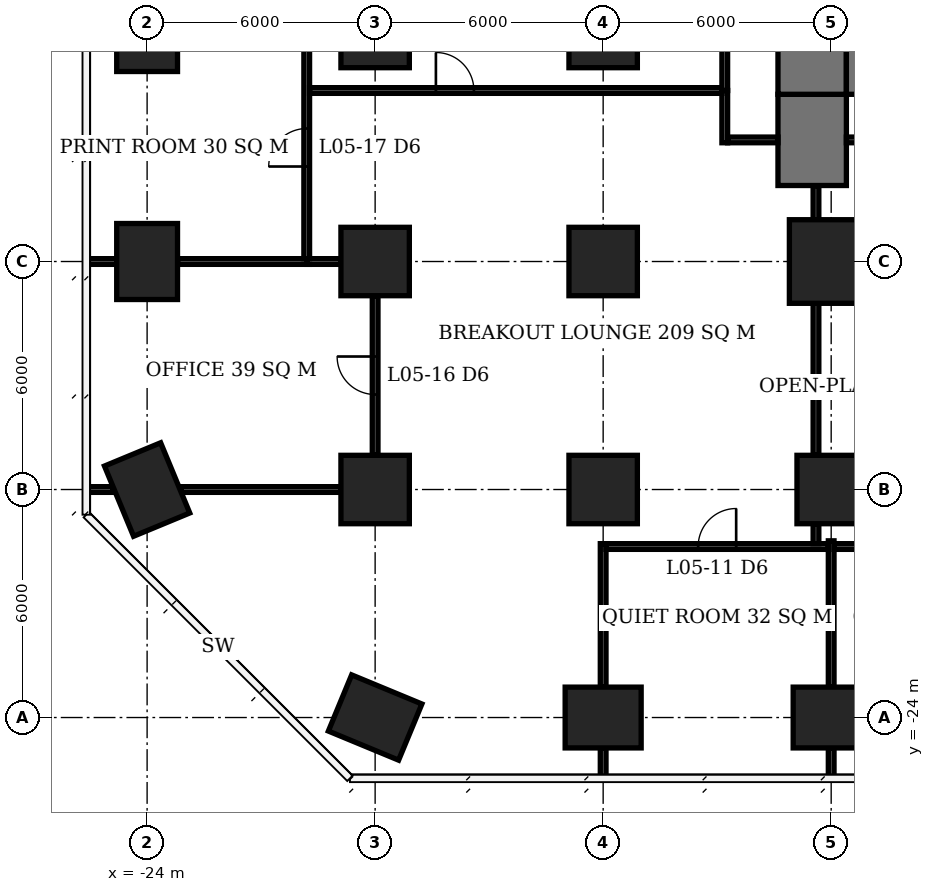
"""IFC4 building model, lengths in metres.
Left out: names, types, materials, properties, quantities, classifications, styles, units other than length and angle.
Written with IfcOpenShell. Run it as: python <this file> out.ifc"""

import sys

from ifc_helpers import new_model, si_unit, direction, frame, frame_2d, origin, origin_2d, place, context, subcontext, project, spatial, rectangle, extrude, element, fill, save


model = new_model("IFC4")
c1 = context("Model", 3, precision=1e-05, world=origin(), true_north=direction((0.0, 1.0)))
c2 = subcontext(c1, "Body", "Model", "MODEL_VIEW")
j1 = project(units=[si_unit("LENGTHUNIT", "METRE"), si_unit("PLANEANGLEUNIT", "RADIAN")], contexts=[c1])
p1 = place(None, origin())
s1 = spatial("IfcSite", under=j1, at=p1, CompositionType="ELEMENT")
p2 = place(p1, origin())
s2 = spatial("IfcBuilding", under=s1, at=p2, CompositionType="ELEMENT")
p3 = place(p2, frame((0.0, 0.0, 26.0)))
s3 = spatial("IfcBuildingStorey", under=s2, at=p3, CompositionType="ELEMENT", Elevation=26.0)
for number, where, z_axis, x_axis in (
    (1, (-24.0, -18.0, 0.0), (0.0, 0.0, 1.0), (-0.383, 0.924, 0.0)),
    (2, (-24.0, -12.0, 0.0), (0.0, 0.0, 1.0), (0.0, 1.0, 0.0)),
    (3, (-24.0, -6.0, 0.0), (0.0, 0.0, 1.0), (0.0, 1.0, 0.0)),
    (4, (-18.0, -24.0, 0.0), (0.0, 0.0, 1.0), (-0.924, 0.383, 0.0)),
):
    element("IfcColumn", number, at=place(p3, frame(where, z_axis=z_axis, x_axis=x_axis)), inside=s3, PredefinedType="COLUMN", context=c2, shape_type="SweptSolid", body=[
        extrude(rectangle(XDim=2.0, YDim=1.6, at=origin_2d()), origin(), (0.0, 0.0, 1.0), 3.9),
    ])
for number, where, z_axis, x_axis in (
    (5, (-18.0, -18.0, 0.0), (0.0, 0.0, 1.0), (1.0, 0.0, 0.0)),
    (6, (-18.0, -12.0, 0.0), (0.0, 0.0, 1.0), (1.0, 0.0, 0.0)),
    (7, (-18.0, -6.0, 0.0), (0.0, 0.0, 1.0), (1.0, 0.0, 0.0)),
):
    element("IfcColumn", number, at=place(p3, frame(where, z_axis=z_axis, x_axis=x_axis)), inside=s3, PredefinedType="COLUMN", context=c2, shape_type="SweptSolid", body=[
        extrude(rectangle(XDim=1.8, YDim=1.8, at=origin_2d()), origin(), (0.0, 0.0, 1.0), 3.9),
    ])
p4 = place(p3, frame((-12.0, -24.0, 0.0), z_axis=(0.0, 0.0, 1.0), x_axis=(1.0, 0.0, 0.0)))
e8 = element("IfcColumn", 8, at=p4, inside=s3, PredefinedType="COLUMN", context=c2, shape_type="SweptSolid", body=[
    extrude(rectangle(XDim=2.0, YDim=1.6, at=origin_2d()), origin(), (0.0, 0.0, 1.0), 3.9),
])
for number, where, z_axis, x_axis in (
    (9, (-12.0, -18.0, 0.0), (0.0, 0.0, 1.0), (1.0, 0.0, 0.0)),
    (10, (-12.0, -12.0, 0.0), (0.0, 0.0, 1.0), (1.0, 0.0, 0.0)),
    (11, (-12.0, -6.0, 0.0), (0.0, 0.0, 1.0), (1.0, 0.0, 0.0)),
):
    element("IfcColumn", number, at=place(p3, frame(where, z_axis=z_axis, x_axis=x_axis)), inside=s3, PredefinedType="COLUMN", context=c2, shape_type="SweptSolid", body=[
        extrude(rectangle(XDim=1.8, YDim=1.8, at=origin_2d()), origin(), (0.0, 0.0, 1.0), 3.9),
    ])
p5 = place(p3, frame((-6.0, -24.0, 0.0), z_axis=(0.0, 0.0, 1.0), x_axis=(1.0, 0.0, 0.0)))
e12 = element("IfcColumn", 12, at=p5, inside=s3, PredefinedType="COLUMN", context=c2, shape_type="SweptSolid", body=[
    extrude(rectangle(XDim=2.0, YDim=1.6, at=origin_2d()), origin(), (0.0, 0.0, 1.0), 3.9),
])
p6 = place(p3, frame((-6.0, -18.0, 0.0), z_axis=(0.0, 0.0, 1.0), x_axis=(1.0, 0.0, 0.0)))
e13 = element("IfcColumn", 13, at=p6, inside=s3, PredefinedType="COLUMN", context=c2, shape_type="SweptSolid", body=[
    extrude(rectangle(XDim=1.8, YDim=1.8, at=origin_2d()), origin(), (0.0, 0.0, 1.0), 3.9),
])
p7 = place(p3, frame((-6.0, -12.0, 0.0), z_axis=(0.0, 0.0, 1.0), x_axis=(1.0, 0.0, 0.0)))
e14 = element("IfcColumn", 14, at=p7, inside=s3, PredefinedType="COLUMN", context=c2, shape_type="SweptSolid", body=[
    extrude(rectangle(XDim=2.2, YDim=2.2, at=origin_2d()), origin(), (0.0, 0.0, 1.0), 3.9),
])
p8 = place(p3, frame((-5.6, -6.6, 0.0), z_axis=(0.0, 0.0, 1.0), x_axis=(1.0, 0.0, 0.0)))
e15 = element("IfcWall", 15, at=p8, inside=s3, PredefinedType="SHEAR", context=c2, shape_type="SweptSolid", body=[
    extrude(rectangle(XDim=23.2, YDim=2.0, at=frame_2d((11.6, 0.0))), origin(), (0.0, 0.0, 1.0), 3.9),
])
p9 = place(p3, frame((-6.5, -7.6, 0.0), z_axis=(0.0, 0.0, 1.0), x_axis=(0.0, 1.0, 0.0)))
e16 = element("IfcWall", 16, at=p9, inside=s3, PredefinedType="SHEAR", context=c2, shape_type="SweptSolid", body=[
    extrude(rectangle(XDim=21.2, YDim=1.8, at=frame_2d((10.6, 0.0))), origin(), (0.0, 0.0, 1.0), 3.9),
])
p10 = place(p9, frame((7.8, 0.0, 0.0)))
e17 = element("IfcOpeningElement", 17, at=p10, cuts=e16, PredefinedType="OPENING", context=c2, shape_type="SweptSolid", body=[
    extrude(rectangle(XDim=1.8, YDim=2.4, at=frame_2d((0.9, 1.2))), frame((0.0, 0.91, 0.0), z_axis=(0.0, -1.0, 0.0), x_axis=(1.0, 0.0, 0.0)), (0.0, 0.0, 1.0), 1.82),
])
p11 = place(p3, frame((-6.5, -10.0, 0.0), z_axis=(0.0, 0.0, 1.0), x_axis=(0.0, 1.0, 0.0)))
e18 = element("IfcWall", 18, at=p11, inside=s3, PredefinedType="SHEAR", context=c2, shape_type="SweptSolid", body=[
    extrude(rectangle(XDim=2.4, YDim=1.8, at=frame_2d((1.2, 0.0))), origin(), (0.0, 0.0, 1.0), 3.9),
])
p12 = place(p3, frame((-11.925, -19.5, 0.0), z_axis=(0.0, 0.0, 1.0), x_axis=(1.0, 0.0, 0.0)))
e19 = element("IfcWall", 19, at=p12, inside=s3, PredefinedType="PARTITIONING", context=c2, shape_type="SweptSolid", body=[
    extrude(rectangle(XDim=5.85, YDim=0.15, at=frame_2d((2.925, 0.0))), origin(), (0.0, 0.0, 1.0), 3.65),
])
p13 = place(p12, frame((2.425, 0.0, 0.0)))
e20 = element("IfcOpeningElement", 20, at=p13, cuts=e19, PredefinedType="OPENING", context=c2, shape_type="SweptSolid", body=[
    extrude(rectangle(XDim=1.0, YDim=2.1, at=frame_2d((0.5, 1.05))), frame((0.0, 0.085, 0.0), z_axis=(0.0, -1.0, 0.0), x_axis=(1.0, 0.0, 0.0)), (0.0, 0.0, 1.0), 0.17),
])
p14 = place(p3, frame((-5.925, -19.5, 0.0), z_axis=(0.0, 0.0, 1.0), x_axis=(1.0, 0.0, 0.0)))
e21 = element("IfcWall", 21, at=p14, inside=s3, PredefinedType="PARTITIONING", context=c2, shape_type="SweptSolid", body=[
    extrude(rectangle(XDim=5.85, YDim=0.15, at=frame_2d((2.925, 0.0))), origin(), (0.0, 0.0, 1.0), 3.65),
])
p15 = place(p14, frame((2.425, 0.0, 0.0)))
e22 = element("IfcOpeningElement", 22, at=p15, cuts=e21, PredefinedType="OPENING", context=c2, shape_type="SweptSolid", body=[
    extrude(rectangle(XDim=1.0, YDim=2.1, at=frame_2d((0.5, 1.05))), frame((0.0, 0.085, 0.0), z_axis=(0.0, -1.0, 0.0), x_axis=(1.0, 0.0, 0.0)), (0.0, 0.0, 1.0), 0.17),
])
p16 = place(p3, frame((-25.6, -18.0, 0.0), z_axis=(0.0, 0.0, 1.0), x_axis=(1.0, 0.0, 0.0)))
e23 = element("IfcWall", 23, at=p16, inside=s3, PredefinedType="PARTITIONING", context=c2, shape_type="SweptSolid", body=[
    extrude(rectangle(XDim=0.703, YDim=0.15, at=frame_2d((0.352, 0.0))), origin(), (0.0, 0.0, 1.0), 3.65),
])
p17 = place(p3, frame((-23.103, -18.0, 0.0), z_axis=(0.0, 0.0, 1.0), x_axis=(1.0, 0.0, 0.0)))
e24 = element("IfcWall", 24, at=p17, inside=s3, PredefinedType="PARTITIONING", context=c2, shape_type="SweptSolid", body=[
    extrude(rectangle(XDim=4.203, YDim=0.15, at=frame_2d((2.102, 0.0))), origin(), (0.0, 0.0, 1.0), 3.65),
])
p18 = place(p3, frame((-25.6, -12.0, 0.0), z_axis=(0.0, 0.0, 1.0), x_axis=(1.0, 0.0, 0.0)))
e25 = element("IfcWall", 25, at=p18, inside=s3, PredefinedType="PARTITIONING", context=c2, shape_type="SweptSolid", body=[
    extrude(rectangle(XDim=0.8, YDim=0.15, at=frame_2d((0.4, 0.0))), origin(), (0.0, 0.0, 1.0), 3.65),
])
p19 = place(p3, frame((-23.2, -12.0, 0.0), z_axis=(0.0, 0.0, 1.0), x_axis=(1.0, 0.0, 0.0)))
e26 = element("IfcWall", 26, at=p19, inside=s3, PredefinedType="PARTITIONING", context=c2, shape_type="SweptSolid", body=[
    extrude(rectangle(XDim=3.475, YDim=0.15, at=frame_2d((1.737, 0.0))), origin(), (0.0, 0.0, 1.0), 3.65),
])
p20 = place(p3, frame((-19.8, -12.0, 0.0), z_axis=(0.0, 0.0, 1.0), x_axis=(1.0, 0.0, 0.0)))
e27 = element("IfcWall", 27, at=p20, inside=s3, PredefinedType="PARTITIONING", context=c2, shape_type="SweptSolid", body=[
    extrude(rectangle(XDim=0.9, YDim=0.15, at=frame_2d((0.45, 0.0))), origin(), (0.0, 0.0, 1.0), 3.65),
])
p21 = place(p3, frame((-19.8, -11.925, 0.0), z_axis=(0.0, 0.0, 1.0), x_axis=(0.0, 1.0, 0.0)))
e28 = element("IfcWall", 28, at=p21, inside=s3, PredefinedType="PARTITIONING", context=c2, shape_type="SweptSolid", body=[
    extrude(rectangle(XDim=5.85, YDim=0.15, at=frame_2d((2.925, 0.0))), origin(), (0.0, 0.0, 1.0), 3.65),
])
p22 = place(p21, frame((2.425, 0.0, 0.0)))
e29 = element("IfcOpeningElement", 29, at=p22, cuts=e28, PredefinedType="OPENING", context=c2, shape_type="SweptSolid", body=[
    extrude(rectangle(XDim=1.0, YDim=2.1, at=frame_2d((0.5, 1.05))), frame((0.0, 0.085, 0.0), z_axis=(0.0, -1.0, 0.0), x_axis=(1.0, 0.0, 0.0)), (0.0, 0.0, 1.0), 0.17),
])
p23 = place(p3, frame((-18.0, -17.1, 0.0), z_axis=(0.0, 0.0, 1.0), x_axis=(0.0, 1.0, 0.0)))
e30 = element("IfcWall", 30, at=p23, inside=s3, PredefinedType="PARTITIONING", context=c2, shape_type="SweptSolid", body=[
    extrude(rectangle(XDim=4.2, YDim=0.15, at=frame_2d((2.1, 0.0))), origin(), (0.0, 0.0, 1.0), 3.65),
])
p24 = place(p23, frame((1.6, 0.0, 0.0)))
e31 = element("IfcOpeningElement", 31, at=p24, cuts=e30, PredefinedType="OPENING", context=c2, shape_type="SweptSolid", body=[
    extrude(rectangle(XDim=1.0, YDim=2.1, at=frame_2d((0.5, 1.05))), frame((0.0, 0.085, 0.0), z_axis=(0.0, -1.0, 0.0), x_axis=(1.0, 0.0, 0.0)), (0.0, 0.0, 1.0), 0.17),
])
p25 = place(p3, frame((-12.0, -25.6, 0.0), z_axis=(0.0, 0.0, 1.0), x_axis=(0.0, 1.0, 0.0)))
e32 = element("IfcWall", 32, at=p25, inside=s3, PredefinedType="PARTITIONING", context=c2, shape_type="SweptSolid", body=[
    extrude(rectangle(XDim=0.8, YDim=0.15, at=frame_2d((0.4, 0.0))), origin(), (0.0, 0.0, 1.0), 3.65),
])
p26 = place(p3, frame((-12.0, -23.2, 0.0), z_axis=(0.0, 0.0, 1.0), x_axis=(0.0, 1.0, 0.0)))
e33 = element("IfcWall", 33, at=p26, inside=s3, PredefinedType="PARTITIONING", context=c2, shape_type="SweptSolid", body=[
    extrude(rectangle(XDim=3.775, YDim=0.15, at=frame_2d((1.887, 0.0))), origin(), (0.0, 0.0, 1.0), 3.65),
])
p27 = place(p3, frame((-6.0, -25.6, 0.0), z_axis=(0.0, 0.0, 1.0), x_axis=(0.0, 1.0, 0.0)))
e34 = element("IfcWall", 34, at=p27, inside=s3, PredefinedType="PARTITIONING", context=c2, shape_type="SweptSolid", body=[
    extrude(rectangle(XDim=0.8, YDim=0.15, at=frame_2d((0.4, 0.0))), origin(), (0.0, 0.0, 1.0), 3.65),
])
p28 = place(p3, frame((-6.0, -23.2, 0.0), z_axis=(0.0, 0.0, 1.0), x_axis=(0.0, 1.0, 0.0)))
e35 = element("IfcWall", 35, at=p28, inside=s3, PredefinedType="PARTITIONING", context=c2, shape_type="SweptSolid", body=[
    extrude(rectangle(XDim=3.85, YDim=0.15, at=frame_2d((1.925, 0.0))), origin(), (0.0, 0.0, 1.0), 3.65),
])
p29 = place(p3, frame((-19.725, -7.5, 0.0), z_axis=(0.0, 0.0, 1.0), x_axis=(1.0, 0.0, 0.0)))
e36 = element("IfcWall", 36, at=p29, inside=s3, PredefinedType="PARTITIONING", context=c2, shape_type="SweptSolid", body=[
    extrude(rectangle(XDim=10.85, YDim=0.15, at=frame_2d((5.425, 0.0))), origin(), (0.0, 0.0, 1.0), 3.65),
])
p30 = place(p29, frame((3.324, 0.0, 0.0)))
e37 = element("IfcOpeningElement", 37, at=p30, cuts=e36, PredefinedType="OPENING", context=c2, shape_type="SweptSolid", body=[
    extrude(rectangle(XDim=1.0, YDim=2.1, at=frame_2d((0.5, 1.05))), frame((0.0, 0.085, 0.0), z_axis=(0.0, -1.0, 0.0), x_axis=(1.0, 0.0, 0.0)), (0.0, 0.0, 1.0), 0.17),
])
p31 = place(p3, frame((-8.8, -8.875, 0.0), z_axis=(0.0, 0.0, 1.0), x_axis=(0.0, 1.0, 0.0)))
e38 = element("IfcWall", 38, at=p31, inside=s3, PredefinedType="PARTITIONING", context=c2, shape_type="SweptSolid", body=[
    extrude(rectangle(XDim=1.375, YDim=0.15, at=frame_2d((0.688, 0.0))), origin(), (0.0, 0.0, 1.0), 3.65),
])
p32 = place(p3, frame((-8.725, -8.8, 0.0), z_axis=(0.0, 0.0, 1.0), x_axis=(1.0, 0.0, 0.0)))
e39 = element("IfcWall", 39, at=p32, inside=s3, PredefinedType="PARTITIONING", context=c2, shape_type="SweptSolid", body=[
    extrude(rectangle(XDim=1.325, YDim=0.15, at=frame_2d((0.663, 0.0))), origin(), (0.0, 0.0, 1.0), 3.65),
])
p33 = place(p3, frame((-8.8, -7.5, 0.0), z_axis=(0.0, 0.0, 1.0), x_axis=(0.0, 1.0, 0.0)))
e40 = element("IfcWall", 40, at=p33, inside=s3, PredefinedType="PARTITIONING", context=c2, shape_type="SweptSolid", body=[
    extrude(rectangle(XDim=8.925, YDim=0.15, at=frame_2d((4.462, 0.0))), origin(), (0.0, 0.0, 1.0), 3.65),
])
p34 = place(p33, frame((2.65, 0.0, 0.0)))
e41 = element("IfcOpeningElement", 41, at=p34, cuts=e40, PredefinedType="OPENING", context=c2, shape_type="SweptSolid", body=[
    extrude(rectangle(XDim=1.0, YDim=2.1, at=frame_2d((0.5, 1.05))), frame((0.0, 0.085, 0.0), z_axis=(0.0, -1.0, 0.0), x_axis=(1.0, 0.0, 0.0)), (0.0, 0.0, 1.0), 0.17),
])
p35 = place(p3, frame((-6.4, -19.425, 0.0), z_axis=(0.0, 0.0, 1.0), x_axis=(0.0, 1.0, 0.0)))
e42 = element("IfcWall", 42, at=p35, inside=s3, PredefinedType="PARTITIONING", context=c2, shape_type="SweptSolid", body=[
    extrude(rectangle(XDim=0.525, YDim=0.15, at=frame_2d((0.263, 0.0))), origin(), (0.0, 0.0, 1.0), 3.65),
])
p36 = place(p3, frame((-6.4, -17.1, 0.0), z_axis=(0.0, 0.0, 1.0), x_axis=(0.0, 1.0, 0.0)))
e43 = element("IfcWall", 43, at=p36, inside=s3, PredefinedType="PARTITIONING", context=c2, shape_type="SweptSolid", body=[
    extrude(rectangle(XDim=4.0, YDim=0.15, at=frame_2d((2.0, 0.0))), origin(), (0.0, 0.0, 1.0), 3.65),
])
p37 = place(p3, frame((-6.4, -10.9, 0.0), z_axis=(0.0, 0.0, 1.0), x_axis=(0.0, 1.0, 0.0)))
e44 = element("IfcWall", 44, at=p37, inside=s3, PredefinedType="PARTITIONING", context=c2, shape_type="SweptSolid", body=[
    extrude(rectangle(XDim=0.9, YDim=0.15, at=frame_2d((0.45, 0.0))), origin(), (0.0, 0.0, 1.0), 3.65),
])
p38 = place(p3, frame((-5.6, -8.8, 0.0), z_axis=(0.0, 0.0, 1.0), x_axis=(1.0, 0.0, 0.0)))
e45 = element("IfcWall", 45, at=p38, inside=s3, PredefinedType="PARTITIONING", context=c2, shape_type="SweptSolid", body=[
    extrude(rectangle(XDim=4.025, YDim=0.15, at=frame_2d((2.013, 0.0))), origin(), (0.0, 0.0, 1.0), 3.65),
])
p39 = place(p38, frame((0.935, 0.0, 0.0)))
e46 = element("IfcOpeningElement", 46, at=p39, cuts=e45, PredefinedType="OPENING", context=c2, shape_type="SweptSolid", body=[
    extrude(rectangle(XDim=1.0, YDim=2.1, at=frame_2d((0.5, 1.05))), frame((0.0, 0.085, 0.0), z_axis=(0.0, -1.0, 0.0), x_axis=(1.0, 0.0, 0.0)), (0.0, 0.0, 1.0), 0.17),
])
p40 = place(p13, origin())
e47 = element("IfcDoor", 47, at=p40, inside=s3, OperationType="SINGLE_SWING_RIGHT", PredefinedType="DOOR", context=c2, shape_type="SweptSolid", body=[
    extrude(rectangle(XDim=1.0, YDim=2.1, at=frame_2d((0.5, 1.05))), frame((0.0, 0.025, 0.0), z_axis=(0.0, -1.0, 0.0), x_axis=(1.0, 0.0, 0.0)), (0.0, 0.0, 1.0), 0.05),
])
fill(e20, e47)
p41 = place(p24, origin())
e48 = element("IfcDoor", 48, at=p41, inside=s3, OperationType="SINGLE_SWING_RIGHT", PredefinedType="DOOR", context=c2, shape_type="SweptSolid", body=[
    extrude(rectangle(XDim=1.0, YDim=2.1, at=frame_2d((0.5, 1.05))), frame((0.0, 0.025, 0.0), z_axis=(0.0, -1.0, 0.0), x_axis=(1.0, 0.0, 0.0)), (0.0, 0.0, 1.0), 0.05),
])
fill(e31, e48)
p42 = place(p22, origin())
e49 = element("IfcDoor", 49, at=p42, inside=s3, OperationType="SINGLE_SWING_LEFT", PredefinedType="DOOR", context=c2, shape_type="SweptSolid", body=[
    extrude(rectangle(XDim=1.0, YDim=2.1, at=frame_2d((0.5, 1.05))), frame((0.0, 0.025, 0.0), z_axis=(0.0, -1.0, 0.0), x_axis=(1.0, 0.0, 0.0)), (0.0, 0.0, 1.0), 0.05),
])
fill(e29, e49)
p43 = place(p30, origin())
e50 = element("IfcDoor", 50, at=p43, inside=s3, OperationType="SINGLE_SWING_LEFT", PredefinedType="DOOR", context=c2, shape_type="SweptSolid", body=[
    extrude(rectangle(XDim=1.0, YDim=2.1, at=frame_2d((0.5, 1.05))), frame((0.0, 0.025, 0.0), z_axis=(0.0, -1.0, 0.0), x_axis=(1.0, 0.0, 0.0)), (0.0, 0.0, 1.0), 0.05),
])
fill(e37, e50)
save(model, sys.argv[1])
